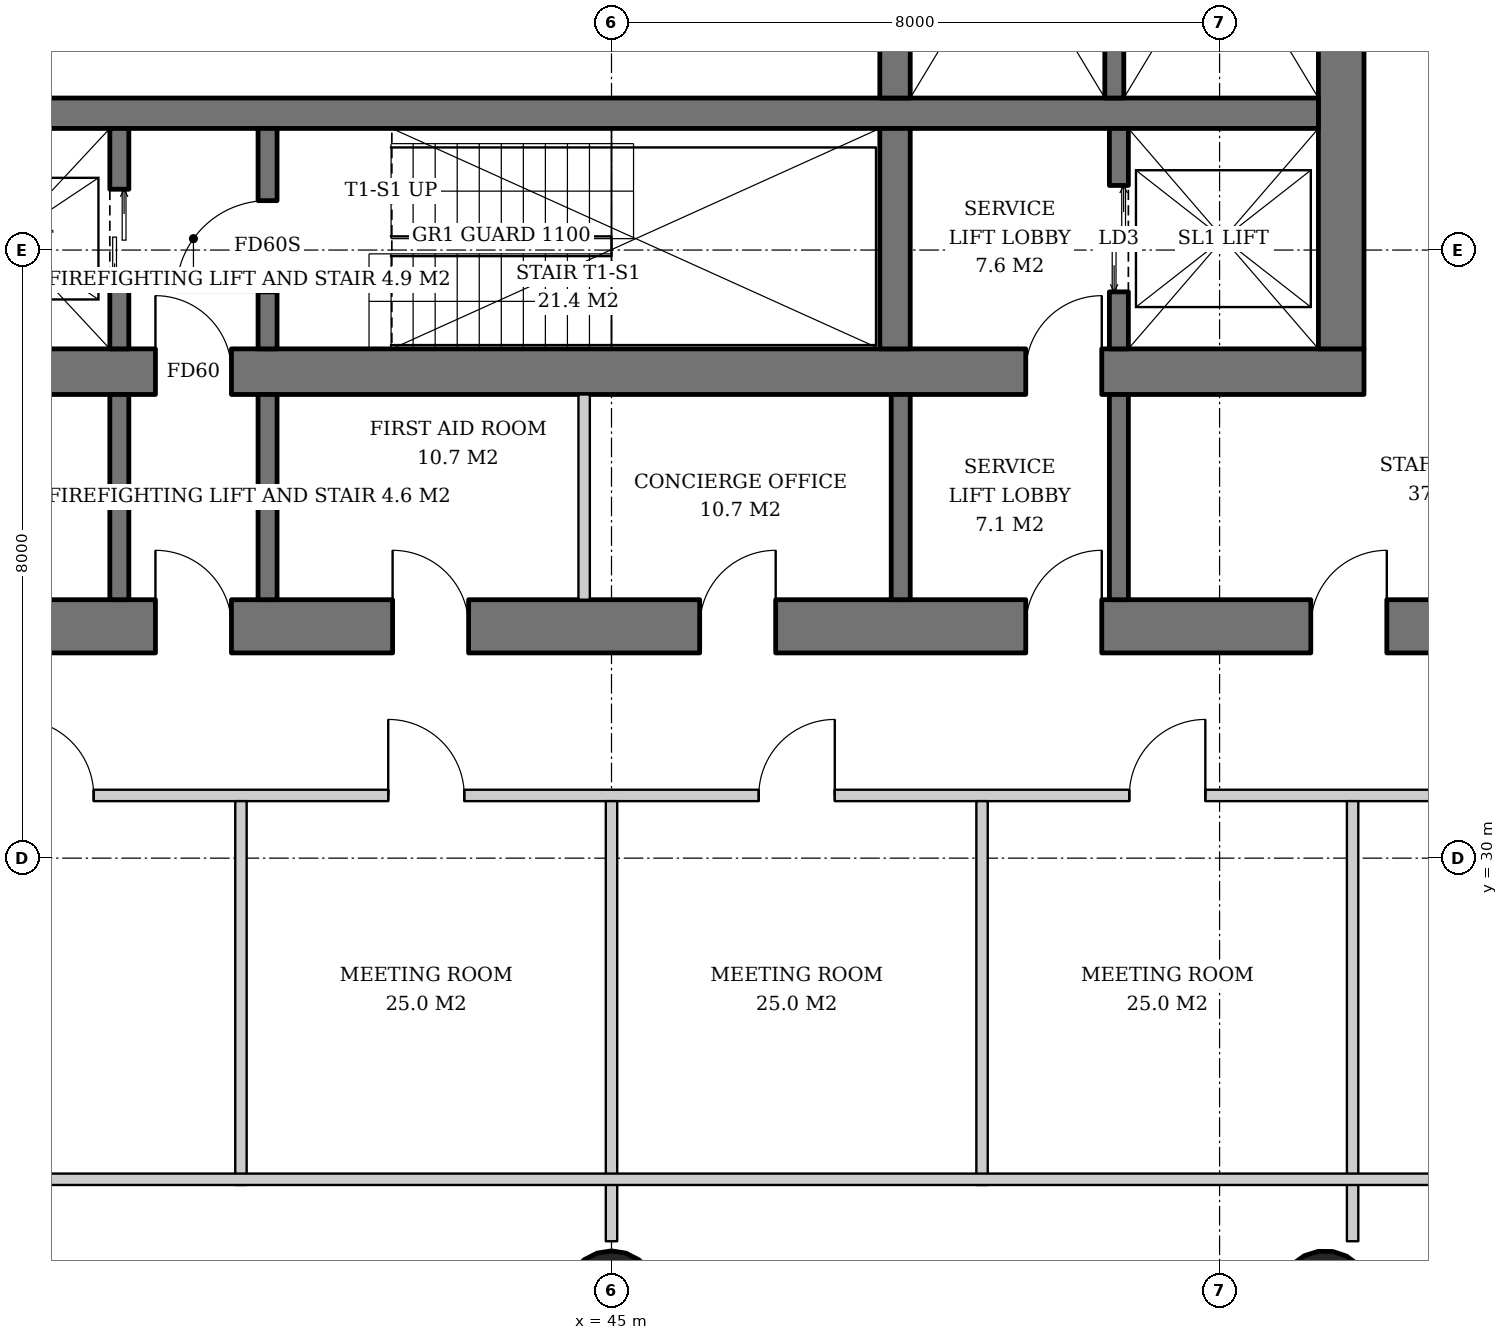
"""IFC4 building model, lengths in metres.
Left out: names, types, materials, properties, quantities, classifications, styles, units other than length and angle.
Written with IfcOpenShell. Run it as: python <this file> out.ifc"""

import sys

from ifc_helpers import new_model, si_unit, direction, frame, frame_2d, origin, origin_2d, place, context, subcontext, project, spatial, rectangle, hollow_circle, extrude, element, fill, save


model = new_model("IFC4")
c1 = context("Model", 3, precision=1e-05, world=origin(), true_north=direction((0.0, 1.0)))
c2 = subcontext(c1, "Body", "Model", "MODEL_VIEW")
j1 = project(units=[si_unit("LENGTHUNIT", "METRE"), si_unit("PLANEANGLEUNIT", "RADIAN")], contexts=[c1])
p1 = place(None, origin())
s1 = spatial("IfcSite", under=j1, at=p1, CompositionType="ELEMENT")
p2 = place(p1, origin())
s2 = spatial("IfcBuilding", under=s1, at=p2, CompositionType="ELEMENT")
p3 = place(p2, frame((0.0, 0.0, 89.4)))
s3 = spatial("IfcBuildingStorey", under=s2, at=p3, CompositionType="ELEMENT", Elevation=89.4)
p4 = place(p3, frame((45.0, 24.186, 0.0), z_axis=(0.0, 0.031914348339, 0.999490607445), x_axis=(-1.0, 0.0, 0.0)))
e1 = element("IfcColumn", 1, at=p4, inside=s3, PredefinedType="COLUMN", context=c2, shape_type="SweptSolid", body=[
    extrude(hollow_circle(Radius=0.61, WallThickness=0.04, at=origin_2d()), origin(), (0.0, 0.0, 1.0), 3.802),
])
p5 = place(p3, frame((54.407, 24.186, 0.0), z_axis=(-0.015987237665, 0.031910269556, 0.999362868496), x_axis=(-0.894067115991, -0.447933021895, 0.0)))
e2 = element("IfcColumn", 2, at=p5, inside=s3, PredefinedType="COLUMN", context=c2, shape_type="SweptSolid", body=[
    extrude(hollow_circle(Radius=0.61, WallThickness=0.04, at=origin_2d()), origin(), (0.0, 0.0, 1.0), 3.802),
])
p6 = place(p3, frame((35.1, 36.4, 0.0), z_axis=(0.0, 0.0, 1.0), x_axis=(1.0, 0.0, 0.0)))
e3 = element("IfcWall", 3, at=p6, inside=s3, PredefinedType="SHEAR", context=c2, shape_type="SweptSolid", body=[
    extrude(rectangle(XDim=19.8, YDim=0.6, at=frame_2d((9.9, 0.0))), origin(), (0.0, 0.0, 1.0), 3.8),
])
p7 = place(p6, frame((3.9, 0.0, 0.0)))
e4 = element("IfcOpeningElement", 4, at=p7, cuts=e3, PredefinedType="OPENING", context=c2, shape_type="SweptSolid", body=[
    extrude(rectangle(XDim=1.0, YDim=2.1, at=frame_2d((0.5, 1.05))), frame((0.0, 0.31, 0.0), z_axis=(0.0, -1.0, 0.0), x_axis=(1.0, 0.0, 0.0)), (0.0, 0.0, 1.0), 0.62),
])
p8 = place(p6, frame((15.35, 0.0, 0.0)))
e5 = element("IfcOpeningElement", 5, at=p8, cuts=e3, PredefinedType="OPENING", context=c2, shape_type="SweptSolid", body=[
    extrude(rectangle(XDim=1.0, YDim=2.1, at=frame_2d((0.5, 1.05))), frame((0.0, 0.31, 0.0), z_axis=(0.0, -1.0, 0.0), x_axis=(1.0, 0.0, 0.0)), (0.0, 0.0, 1.0), 0.62),
])
p9 = place(p3, frame((54.6, 36.7, 0.0), z_axis=(0.0, 0.0, 1.0), x_axis=(0.0, 1.0, 0.0)))
e6 = element("IfcWall", 6, at=p9, inside=s3, PredefinedType="SHEAR", context=c2, shape_type="SweptSolid", body=[
    extrude(rectangle(XDim=18.6, YDim=0.6, at=frame_2d((9.3, 0.0))), origin(), (0.0, 0.0, 1.0), 3.8),
])
p10 = place(p9, frame((8.4, 0.0, 0.0)))
e7 = element("IfcOpeningElement", 7, at=p10, cuts=e6, PredefinedType="OPENING", context=c2, shape_type="SweptSolid", body=[
    extrude(rectangle(XDim=1.8, YDim=2.4, at=frame_2d((0.9, 1.2))), frame((0.0, 0.31, 0.0), z_axis=(0.0, -1.0, 0.0), x_axis=(1.0, 0.0, 0.0)), (0.0, 0.0, 1.0), 0.62),
])
p11 = place(p3, frame((31.7, 33.05, 0.0), z_axis=(0.0, 0.0, 1.0), x_axis=(1.0, 0.0, 0.0)))
e8 = element("IfcWall", 8, at=p11, inside=s3, PredefinedType="SHEAR", context=c2, shape_type="SweptSolid", body=[
    extrude(rectangle(XDim=26.6, YDim=0.7, at=frame_2d((13.3, 0.0))), origin(), (0.0, 0.0, 1.0), 3.8),
])
p12 = place(p11, frame((7.3, 0.0, 0.0)))
e9 = element("IfcOpeningElement", 9, at=p12, cuts=e8, PredefinedType="OPENING", context=c2, shape_type="SweptSolid", body=[
    extrude(rectangle(XDim=1.0, YDim=2.1, at=frame_2d((0.5, 1.05))), frame((0.0, 0.36, 0.0), z_axis=(0.0, -1.0, 0.0), x_axis=(1.0, 0.0, 0.0)), (0.0, 0.0, 1.0), 0.72),
])
p13 = place(p11, frame((18.75, 0.0, 0.0)))
e10 = element("IfcOpeningElement", 10, at=p13, cuts=e8, PredefinedType="OPENING", context=c2, shape_type="SweptSolid", body=[
    extrude(rectangle(XDim=1.0, YDim=2.1, at=frame_2d((0.5, 1.05))), frame((0.0, 0.36, 0.0), z_axis=(0.0, -1.0, 0.0), x_axis=(1.0, 0.0, 0.0)), (0.0, 0.0, 1.0), 0.72),
])
p14 = place(p11, frame((3.2, 0.0, 0.0)))
e11 = element("IfcOpeningElement", 11, at=p14, cuts=e8, PredefinedType="OPENING", context=c2, shape_type="SweptSolid", body=[
    extrude(rectangle(XDim=1.0, YDim=2.1, at=frame_2d((0.5, 1.05))), frame((0.0, 0.36, 0.0), z_axis=(0.0, -1.0, 0.0), x_axis=(1.0, 0.0, 0.0)), (0.0, 0.0, 1.0), 0.72),
])
p15 = place(p11, frame((10.42, 0.0, 0.0)))
e12 = element("IfcOpeningElement", 12, at=p15, cuts=e8, PredefinedType="OPENING", context=c2, shape_type="SweptSolid", body=[
    extrude(rectangle(XDim=1.0, YDim=2.1, at=frame_2d((0.5, 1.05))), frame((0.0, 0.36, 0.0), z_axis=(0.0, -1.0, 0.0), x_axis=(1.0, 0.0, 0.0)), (0.0, 0.0, 1.0), 0.72),
])
p16 = place(p11, frame((14.46, 0.0, 0.0)))
e13 = element("IfcOpeningElement", 13, at=p16, cuts=e8, PredefinedType="OPENING", context=c2, shape_type="SweptSolid", body=[
    extrude(rectangle(XDim=1.0, YDim=2.1, at=frame_2d((0.5, 1.05))), frame((0.0, 0.36, 0.0), z_axis=(0.0, -1.0, 0.0), x_axis=(1.0, 0.0, 0.0)), (0.0, 0.0, 1.0), 0.72),
])
p17 = place(p11, frame((22.5, 0.0, 0.0)))
e14 = element("IfcOpeningElement", 14, at=p17, cuts=e8, PredefinedType="OPENING", context=c2, shape_type="SweptSolid", body=[
    extrude(rectangle(XDim=1.0, YDim=2.1, at=frame_2d((0.5, 1.05))), frame((0.0, 0.36, 0.0), z_axis=(0.0, -1.0, 0.0), x_axis=(1.0, 0.0, 0.0)), (0.0, 0.0, 1.0), 0.72),
])
p18 = place(p3, frame((35.7, 39.8, 0.0), z_axis=(0.0, 0.0, 1.0), x_axis=(1.0, 0.0, 0.0)))
e15 = element("IfcWall", 15, at=p18, inside=s3, PredefinedType="SHEAR", context=c2, shape_type="SweptSolid", body=[
    extrude(rectangle(XDim=18.6, YDim=0.4, at=frame_2d((9.3, 0.0))), origin(), (0.0, 0.0, 1.0), 3.8),
])
p19 = place(p3, frame((48.73, 36.7, 0.0), z_axis=(0.0, 0.0, 1.0), x_axis=(0.0, 1.0, 0.0)))
e16 = element("IfcWall", 16, at=p19, inside=s3, PredefinedType="SHEAR", context=c2, shape_type="SweptSolid", body=[
    extrude(rectangle(XDim=2.9, YDim=0.4, at=frame_2d((1.45, 0.0))), origin(), (0.0, 0.0, 1.0), 3.8),
])
p20 = place(p3, frame((48.73, 40.0, 0.0), z_axis=(0.0, 0.0, 1.0), x_axis=(0.0, 1.0, 0.0)))
e17 = element("IfcWall", 17, at=p20, inside=s3, PredefinedType="SHEAR", context=c2, shape_type="SweptSolid", body=[
    extrude(rectangle(XDim=12.0, YDim=0.4, at=frame_2d((6.0, 0.0))), origin(), (0.0, 0.0, 1.0), 3.8),
])
p21 = place(p3, frame((38.525, 36.7, 0.0), z_axis=(0.0, 0.0, 1.0), x_axis=(0.0, 1.0, 0.0)))
e18 = element("IfcWall", 18, at=p21, inside=s3, PredefinedType="SHEAR", context=c2, shape_type="SweptSolid", body=[
    extrude(rectangle(XDim=2.9, YDim=0.25, at=frame_2d((1.45, 0.0))), origin(), (0.0, 0.0, 1.0), 3.8),
])
p22 = place(p21, frame((0.8, 0.0, 0.0)))
e19 = element("IfcOpeningElement", 19, at=p22, cuts=e18, PredefinedType="OPENING", context=c2, shape_type="SweptSolid", body=[
    extrude(rectangle(XDim=1.3, YDim=2.2, at=frame_2d((0.65, 1.1))), frame((0.0, 0.135, 0.0), z_axis=(0.0, -1.0, 0.0), x_axis=(1.0, 0.0, 0.0)), (0.0, 0.0, 1.0), 0.27),
])
p23 = place(p3, frame((40.475, 36.7, 0.0), z_axis=(0.0, 0.0, 1.0), x_axis=(0.0, 1.0, 0.0)))
e20 = element("IfcWall", 20, at=p23, inside=s3, PredefinedType="SHEAR", context=c2, shape_type="SweptSolid", body=[
    extrude(rectangle(XDim=2.9, YDim=0.25, at=frame_2d((1.45, 0.0))), origin(), (0.0, 0.0, 1.0), 3.8),
])
p24 = place(p23, frame((0.75, 0.0, 0.0)))
e21 = element("IfcOpeningElement", 21, at=p24, cuts=e20, PredefinedType="OPENING", context=c2, shape_type="SweptSolid", body=[
    extrude(rectangle(XDim=1.2, YDim=2.1, at=frame_2d((0.6, 1.05))), frame((0.0, 0.135, 0.0), z_axis=(0.0, -1.0, 0.0), x_axis=(1.0, 0.0, 0.0)), (0.0, 0.0, 1.0), 0.27),
])
p25 = place(p3, frame((51.675, 36.7, 0.0), z_axis=(0.0, 0.0, 1.0), x_axis=(0.0, 1.0, 0.0)))
e22 = element("IfcWall", 22, at=p25, inside=s3, PredefinedType="SHEAR", context=c2, shape_type="SweptSolid", body=[
    extrude(rectangle(XDim=2.9, YDim=0.25, at=frame_2d((1.45, 0.0))), origin(), (0.0, 0.0, 1.0), 3.8),
])
p26 = place(p25, frame((0.75, 0.0, 0.0)))
e23 = element("IfcOpeningElement", 23, at=p26, cuts=e22, PredefinedType="OPENING", context=c2, shape_type="SweptSolid", body=[
    extrude(rectangle(XDim=1.4, YDim=2.4, at=frame_2d((0.7, 1.2))), frame((0.0, 0.135, 0.0), z_axis=(0.0, -1.0, 0.0), x_axis=(1.0, 0.0, 0.0)), (0.0, 0.0, 1.0), 0.27),
])
p27 = place(p3, frame((51.615, 44.25, 0.0), z_axis=(0.0, 0.0, 1.0), x_axis=(0.0, -1.0, 0.0)))
e24 = element("IfcWall", 24, at=p27, inside=s3, PredefinedType="SHEAR", context=c2, shape_type="SweptSolid", body=[
    extrude(rectangle(XDim=4.25, YDim=0.25, at=frame_2d((2.125, 0.0))), origin(), (0.0, 0.0, 1.0), 3.8),
])
for number, where, z_axis, x_axis in (
    (25, (38.525, 33.4, 0.0), (0.0, 0.0, 1.0), (0.0, 1.0, 0.0)),
    (26, (40.475, 33.4, 0.0), (0.0, 0.0, 1.0), (0.0, 1.0, 0.0)),
    (27, (48.805, 33.4, 0.0), (0.0, 0.0, 1.0), (0.0, 1.0, 0.0)),
    (28, (51.675, 33.4, 0.0), (0.0, 0.0, 1.0), (0.0, 1.0, 0.0)),
):
    element("IfcWall", number, at=place(p3, frame(where, z_axis=z_axis, x_axis=x_axis)), inside=s3, PredefinedType="SOLIDWALL", context=c2, shape_type="SweptSolid", body=[
        extrude(rectangle(XDim=2.7, YDim=0.25, at=frame_2d((1.35, 0.0))), origin(), (0.0, 0.0, 1.0), 3.62),
    ])
p28 = place(p3, frame((44.64, 33.4, 0.0), z_axis=(0.0, 0.0, 1.0), x_axis=(0.0, 1.0, 0.0)))
e29 = element("IfcWall", 29, at=p28, inside=s3, PredefinedType="SOLIDWALL", context=c2, shape_type="SweptSolid", body=[
    extrude(rectangle(XDim=2.7, YDim=0.15, at=frame_2d((1.35, 0.0))), origin(), (0.0, 0.0, 1.0), 3.62),
])
p29 = place(p3, frame((29.75, 30.825, 0.0), z_axis=(0.0, 0.0, 1.0), x_axis=(1.0, 0.0, 0.0)))
e30 = element("IfcWall", 30, at=p29, inside=s3, PredefinedType="PARTITIONING", context=c2, shape_type="SweptSolid", body=[
    extrude(rectangle(XDim=30.35, YDim=0.15, at=frame_2d((15.175, 0.0))), origin(), (0.0, 0.0, 1.0), 2.612),
])
p30 = place(p29, frame((7.438, 0.0, 0.0)))
e31 = element("IfcOpeningElement", 31, at=p30, cuts=e30, PredefinedType="OPENING", context=c2, shape_type="SweptSolid", body=[
    extrude(rectangle(XDim=1.0, YDim=2.1, at=frame_2d((0.5, 1.05))), frame((0.0, 0.085, 0.0), z_axis=(0.0, -1.0, 0.0), x_axis=(1.0, 0.0, 0.0)), (0.0, 0.0, 1.0), 0.17),
])
p31 = place(p29, frame((12.312, 0.0, 0.0)))
e32 = element("IfcOpeningElement", 32, at=p31, cuts=e30, PredefinedType="OPENING", context=c2, shape_type="SweptSolid", body=[
    extrude(rectangle(XDim=1.0, YDim=2.1, at=frame_2d((0.5, 1.05))), frame((0.0, 0.085, 0.0), z_axis=(0.0, -1.0, 0.0), x_axis=(1.0, 0.0, 0.0)), (0.0, 0.0, 1.0), 0.17),
])
p32 = place(p29, frame((17.188, 0.0, 0.0)))
e33 = element("IfcOpeningElement", 33, at=p32, cuts=e30, PredefinedType="OPENING", context=c2, shape_type="SweptSolid", body=[
    extrude(rectangle(XDim=1.0, YDim=2.1, at=frame_2d((0.5, 1.05))), frame((0.0, 0.085, 0.0), z_axis=(0.0, -1.0, 0.0), x_axis=(1.0, 0.0, 0.0)), (0.0, 0.0, 1.0), 0.17),
])
p33 = place(p29, frame((22.062, 0.0, 0.0)))
e34 = element("IfcOpeningElement", 34, at=p33, cuts=e30, PredefinedType="OPENING", context=c2, shape_type="SweptSolid", body=[
    extrude(rectangle(XDim=1.0, YDim=2.1, at=frame_2d((0.5, 1.05))), frame((0.0, 0.085, 0.0), z_axis=(0.0, -1.0, 0.0), x_axis=(1.0, 0.0, 0.0)), (0.0, 0.0, 1.0), 0.17),
])
p34 = place(p3, frame((40.125, 30.75, 0.0), z_axis=(0.0, 0.0, 1.0), x_axis=(0.0, -1.0, 0.0)))
e35 = element("IfcWall", 35, at=p34, inside=s3, PredefinedType="PARTITIONING", context=c2, shape_type="SweptSolid", body=[
    extrude(rectangle(XDim=5.05, YDim=0.15, at=frame_2d((2.525, 0.0))), origin(), (0.0, 0.0, 1.0), 3.62),
])
p35 = place(p3, frame((45.0, 30.75, 0.0), z_axis=(0.0, 0.0, 1.0), x_axis=(0.0, -1.0, 0.0)))
e36 = element("IfcWall", 36, at=p35, inside=s3, PredefinedType="PARTITIONING", context=c2, shape_type="SweptSolid", body=[
    extrude(rectangle(XDim=5.79, YDim=0.15, at=frame_2d((2.895, 0.0))), origin(), (0.0, 0.0, 1.0), 2.858),
])
p36 = place(p3, frame((49.875, 30.75, 0.0), z_axis=(0.0, 0.0, 1.0), x_axis=(0.0, -1.0, 0.0)))
e37 = element("IfcWall", 37, at=p36, inside=s3, PredefinedType="PARTITIONING", context=c2, shape_type="SweptSolid", body=[
    extrude(rectangle(XDim=5.05, YDim=0.15, at=frame_2d((2.525, 0.0))), origin(), (0.0, 0.0, 1.0), 3.62),
])
p37 = place(p3, frame((54.75, 30.75, 0.0), z_axis=(0.0, 0.0, 1.0), x_axis=(0.0, -1.0, 0.0)))
e38 = element("IfcWall", 38, at=p37, inside=s3, PredefinedType="PARTITIONING", context=c2, shape_type="SweptSolid", body=[
    extrude(rectangle(XDim=5.79, YDim=0.15, at=frame_2d((2.895, 0.0))), origin(), (0.0, 0.0, 1.0), 3.62),
])
p38 = place(p3, frame((62.3, 25.775, 0.0), z_axis=(0.0, 0.0, 1.0), x_axis=(-1.0, 0.0, 0.0)))
e39 = element("IfcWall", 39, at=p38, inside=s3, PredefinedType="PARTITIONING", context=c2, shape_type="SweptSolid", body=[
    extrude(rectangle(XDim=34.6, YDim=0.15, at=frame_2d((17.3, 0.0))), origin(), (0.0, 0.0, 1.0), 2.612),
])
p39 = place(p22, origin())
e40 = element("IfcDoor", 40, at=p39, inside=s3, OperationType="DOUBLE_DOOR_SLIDING", PredefinedType="DOOR", context=c2, shape_type="SweptSolid", body=[
    extrude(rectangle(XDim=1.3, YDim=2.2, at=frame_2d((0.65, 1.1))), frame((0.0, 0.025, 0.0), z_axis=(0.0, -1.0, 0.0), x_axis=(1.0, 0.0, 0.0)), (0.0, 0.0, 1.0), 0.05),
])
fill(e19, e40)
p40 = place(p24, origin())
e41 = element("IfcDoor", 41, at=p40, inside=s3, OperationType="SINGLE_SWING_LEFT", PredefinedType="DOOR", context=c2, shape_type="SweptSolid", body=[
    extrude(rectangle(XDim=1.2, YDim=2.1, at=frame_2d((0.6, 1.05))), frame((0.0, 0.025, 0.0), z_axis=(0.0, -1.0, 0.0), x_axis=(1.0, 0.0, 0.0)), (0.0, 0.0, 1.0), 0.05),
])
fill(e21, e41)
p41 = place(p26, origin())
e42 = element("IfcDoor", 42, at=p41, inside=s3, OperationType="DOUBLE_DOOR_SLIDING", PredefinedType="DOOR", context=c2, shape_type="SweptSolid", body=[
    extrude(rectangle(XDim=1.4, YDim=2.4, at=frame_2d((0.7, 1.2))), frame((0.0, 0.025, 0.0), z_axis=(0.0, -1.0, 0.0), x_axis=(1.0, 0.0, 0.0)), (0.0, 0.0, 1.0), 0.05),
])
fill(e23, e42)
p42 = place(p7, origin())
e43 = element("IfcDoor", 43, at=p42, inside=s3, OperationType="SINGLE_SWING_LEFT", PredefinedType="DOOR", context=c2, shape_type="SweptSolid", body=[
    extrude(rectangle(XDim=1.0, YDim=2.1, at=frame_2d((0.5, 1.05))), frame((0.0, 0.025, 0.0), z_axis=(0.0, -1.0, 0.0), x_axis=(1.0, 0.0, 0.0)), (0.0, 0.0, 1.0), 0.05),
])
fill(e4, e43)
p43 = place(p8, origin())
e44 = element("IfcDoor", 44, at=p43, inside=s3, OperationType="SINGLE_SWING_RIGHT", PredefinedType="DOOR", context=c2, shape_type="SweptSolid", body=[
    extrude(rectangle(XDim=1.0, YDim=2.1, at=frame_2d((0.5, 1.05))), frame((0.0, 0.025, 0.0), z_axis=(0.0, -1.0, 0.0), x_axis=(1.0, 0.0, 0.0)), (0.0, 0.0, 1.0), 0.05),
])
fill(e5, e44)
p44 = place(p12, origin())
e45 = element("IfcDoor", 45, at=p44, inside=s3, OperationType="SINGLE_SWING_LEFT", PredefinedType="DOOR", context=c2, shape_type="SweptSolid", body=[
    extrude(rectangle(XDim=1.0, YDim=2.1, at=frame_2d((0.5, 1.05))), frame((0.0, 0.025, 0.0), z_axis=(0.0, -1.0, 0.0), x_axis=(1.0, 0.0, 0.0)), (0.0, 0.0, 1.0), 0.05),
])
fill(e9, e45)
p45 = place(p13, origin())
e46 = element("IfcDoor", 46, at=p45, inside=s3, OperationType="SINGLE_SWING_RIGHT", PredefinedType="DOOR", context=c2, shape_type="SweptSolid", body=[
    extrude(rectangle(XDim=1.0, YDim=2.1, at=frame_2d((0.5, 1.05))), frame((0.0, 0.025, 0.0), z_axis=(0.0, -1.0, 0.0), x_axis=(1.0, 0.0, 0.0)), (0.0, 0.0, 1.0), 0.05),
])
fill(e10, e46)
p46 = place(p15, origin())
e47 = element("IfcDoor", 47, at=p46, inside=s3, OperationType="SINGLE_SWING_LEFT", PredefinedType="DOOR", context=c2, shape_type="SweptSolid", body=[
    extrude(rectangle(XDim=1.0, YDim=2.1, at=frame_2d((0.5, 1.05))), frame((0.0, 0.34, 0.0), z_axis=(0.0, -1.0, 0.0), x_axis=(1.0, 0.0, 0.0)), (0.0, 0.0, 1.0), 0.05),
])
fill(e12, e47)
p47 = place(p16, origin())
e48 = element("IfcDoor", 48, at=p47, inside=s3, OperationType="SINGLE_SWING_RIGHT", PredefinedType="DOOR", context=c2, shape_type="SweptSolid", body=[
    extrude(rectangle(XDim=1.0, YDim=2.1, at=frame_2d((0.5, 1.05))), frame((0.0, 0.34, 0.0), z_axis=(0.0, -1.0, 0.0), x_axis=(1.0, 0.0, 0.0)), (0.0, 0.0, 1.0), 0.05),
])
fill(e13, e48)
p48 = place(p17, origin())
e49 = element("IfcDoor", 49, at=p48, inside=s3, OperationType="SINGLE_SWING_RIGHT", PredefinedType="DOOR", context=c2, shape_type="SweptSolid", body=[
    extrude(rectangle(XDim=1.0, YDim=2.1, at=frame_2d((0.5, 1.05))), frame((0.0, 0.34, 0.0), z_axis=(0.0, -1.0, 0.0), x_axis=(1.0, 0.0, 0.0)), (0.0, 0.0, 1.0), 0.05),
])
fill(e14, e49)
p49 = place(p30, origin())
e50 = element("IfcDoor", 50, at=p49, inside=s3, OperationType="SINGLE_SWING_LEFT", PredefinedType="DOOR", context=c2, shape_type="SweptSolid", body=[
    extrude(rectangle(XDim=1.0, YDim=2.1, at=frame_2d((0.5, 1.05))), frame((0.0, 0.025, 0.0), z_axis=(0.0, -1.0, 0.0), x_axis=(1.0, 0.0, 0.0)), (0.0, 0.0, 1.0), 0.05),
])
fill(e31, e50)
p50 = place(p31, origin())
e51 = element("IfcDoor", 51, at=p50, inside=s3, OperationType="SINGLE_SWING_LEFT", PredefinedType="DOOR", context=c2, shape_type="SweptSolid", body=[
    extrude(rectangle(XDim=1.0, YDim=2.1, at=frame_2d((0.5, 1.05))), frame((0.0, 0.025, 0.0), z_axis=(0.0, -1.0, 0.0), x_axis=(1.0, 0.0, 0.0)), (0.0, 0.0, 1.0), 0.05),
])
fill(e32, e51)
p51 = place(p32, origin())
e52 = element("IfcDoor", 52, at=p51, inside=s3, OperationType="SINGLE_SWING_RIGHT", PredefinedType="DOOR", context=c2, shape_type="SweptSolid", body=[
    extrude(rectangle(XDim=1.0, YDim=2.1, at=frame_2d((0.5, 1.05))), frame((0.0, 0.025, 0.0), z_axis=(0.0, -1.0, 0.0), x_axis=(1.0, 0.0, 0.0)), (0.0, 0.0, 1.0), 0.05),
])
fill(e33, e52)
p52 = place(p33, origin())
e53 = element("IfcDoor", 53, at=p52, inside=s3, OperationType="SINGLE_SWING_RIGHT", PredefinedType="DOOR", context=c2, shape_type="SweptSolid", body=[
    extrude(rectangle(XDim=1.0, YDim=2.1, at=frame_2d((0.5, 1.05))), frame((0.0, 0.025, 0.0), z_axis=(0.0, -1.0, 0.0), x_axis=(1.0, 0.0, 0.0)), (0.0, 0.0, 1.0), 0.05),
])
fill(e34, e53)
save(model, sys.argv[1])
